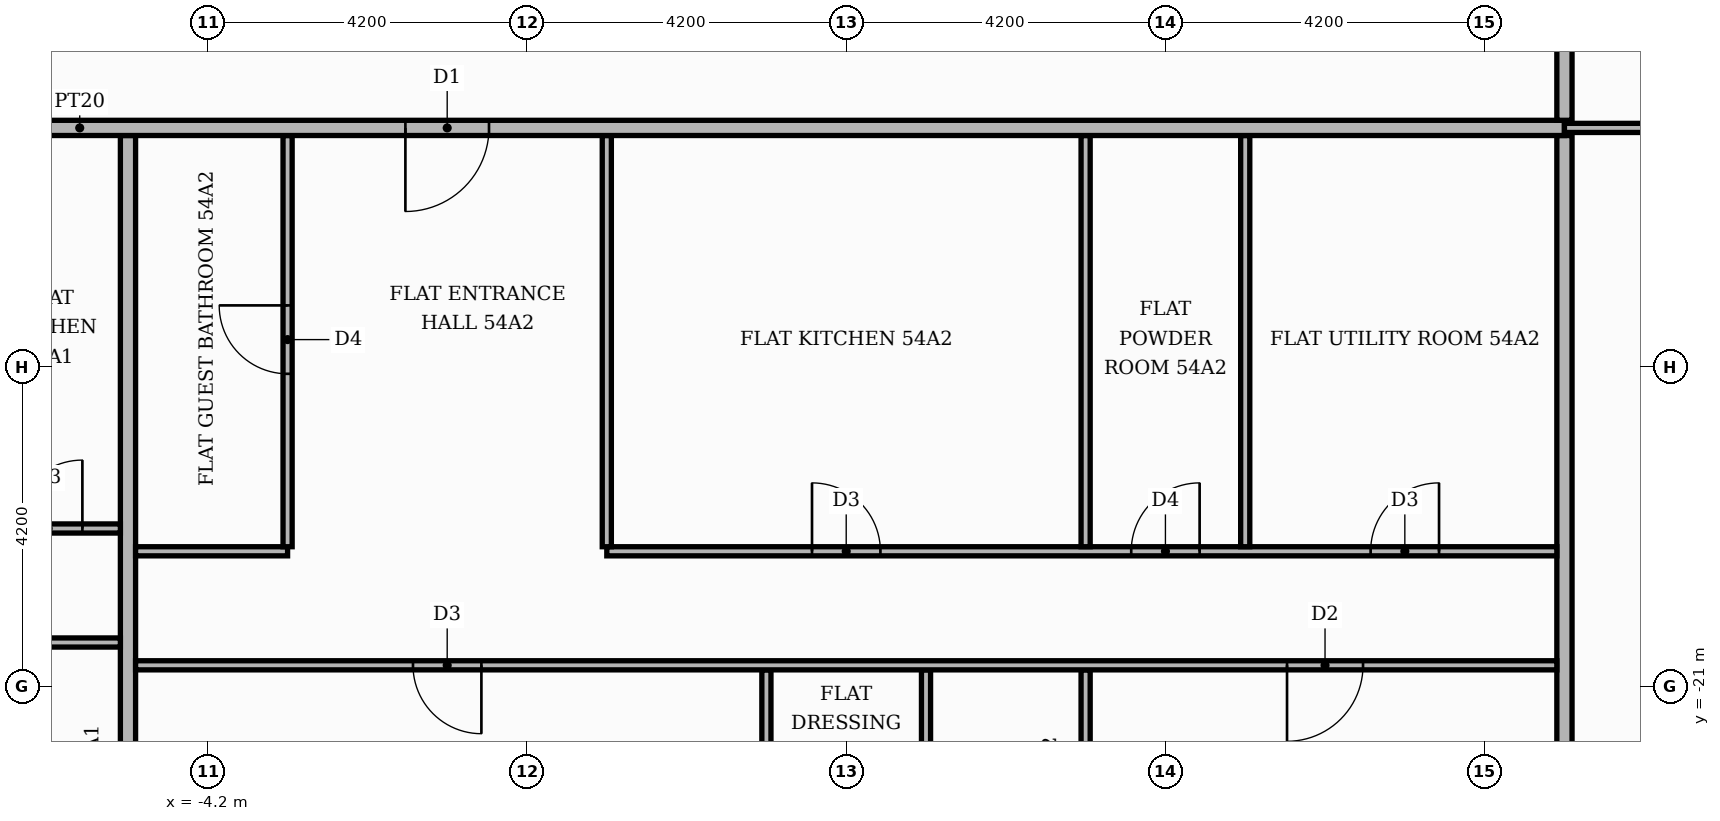
"""IFC4 building model, lengths in metres.
Left out: names, types, materials, properties, quantities, classifications, styles, units other than length and angle.
Written with IfcOpenShell. Run it as: python <this file> out.ifc"""

import sys

from ifc_helpers import new_model, si_unit, direction, frame, frame_2d, origin, place, context, subcontext, project, spatial, rectangle, extrude, element, fill, save


model = new_model("IFC4")
c1 = context("Model", 3, precision=1e-05, world=origin(), true_north=direction((0.0, 1.0)))
c2 = subcontext(c1, "Body", "Model", "MODEL_VIEW")
j1 = project(units=[si_unit("LENGTHUNIT", "METRE"), si_unit("PLANEANGLEUNIT", "RADIAN")], contexts=[c1])
p1 = place(None, origin())
s1 = spatial("IfcSite", under=j1, at=p1, CompositionType="ELEMENT")
p2 = place(p1, origin())
s2 = spatial("IfcBuilding", under=s1, at=p2, CompositionType="ELEMENT")
p3 = place(p2, frame((0.0, 0.0, 227.4)))
s3 = spatial("IfcBuildingStorey", under=s2, at=p3, CompositionType="ELEMENT", Elevation=227.4)
p4 = place(p3, frame((-5.25, -25.42, 0.0), z_axis=(0.0, 0.0, 1.0), x_axis=(0.0, 1.0, 0.0)))
e1 = element("IfcWall", 1, at=p4, inside=s3, PredefinedType="PARTITIONING", context=c2, shape_type="SweptSolid", body=[
    extrude(rectangle(XDim=11.67, YDim=0.2, at=frame_2d((5.835, 0.0))), origin(), (0.0, 0.0, 1.0), 3.48),
])
p5 = place(p3, frame((3.15, -25.42, 0.0), z_axis=(0.0, 0.0, 1.0), x_axis=(0.0, 1.0, 0.0)))
e2 = element("IfcWall", 2, at=p5, inside=s3, PredefinedType="PARTITIONING", context=c2, shape_type="SweptSolid", body=[
    extrude(rectangle(XDim=4.64, YDim=0.12, at=frame_2d((2.32, 0.0))), origin(), (0.0, 0.0, 1.0), 3.48),
])
p6 = place(p5, frame((1.75, 0.0, 0.0)))
e3 = element("IfcOpeningElement", 3, at=p6, cuts=e2, PredefinedType="OPENING", context=c2, shape_type="SweptSolid", body=[
    extrude(rectangle(XDim=0.9, YDim=2.1, at=frame_2d((0.45, 1.05))), frame((0.0, 0.07, 0.0), z_axis=(0.0, -1.0, 0.0), x_axis=(1.0, 0.0, 0.0)), (0.0, 0.0, 1.0), 0.14),
])
p7 = place(p3, frame((5.25, -25.42, 0.0), z_axis=(0.0, 0.0, 1.0), x_axis=(0.0, 1.0, 0.0)))
e4 = element("IfcWall", 4, at=p7, inside=s3, PredefinedType="PARTITIONING", context=c2, shape_type="SweptSolid", body=[
    extrude(rectangle(XDim=4.64, YDim=0.12, at=frame_2d((2.32, 0.0))), origin(), (0.0, 0.0, 1.0), 3.48),
])
p8 = place(p7, frame((1.75, 0.0, 0.0)))
e5 = element("IfcOpeningElement", 5, at=p8, cuts=e4, PredefinedType="OPENING", context=c2, shape_type="SweptSolid", body=[
    extrude(rectangle(XDim=0.9, YDim=2.1, at=frame_2d((0.45, 1.05))), frame((0.0, 0.07, 0.0), z_axis=(0.0, -1.0, 0.0), x_axis=(1.0, 0.0, 0.0)), (0.0, 0.0, 1.0), 0.14),
])
p9 = place(p3, frame((7.35, -25.42, 0.0), z_axis=(0.0, 0.0, 1.0), x_axis=(0.0, 1.0, 0.0)))
e6 = element("IfcWall", 6, at=p9, inside=s3, PredefinedType="PARTITIONING", context=c2, shape_type="SweptSolid", body=[
    extrude(rectangle(XDim=4.64, YDim=0.12, at=frame_2d((2.32, 0.0))), origin(), (0.0, 0.0, 1.0), 3.48),
])
p10 = place(p3, frame((13.65, -25.42, 0.0), z_axis=(0.0, 0.0, 1.0), x_axis=(0.0, 1.0, 0.0)))
e7 = element("IfcWall", 7, at=p10, inside=s3, PredefinedType="PARTITIONING", context=c2, shape_type="SweptSolid", body=[
    extrude(rectangle(XDim=11.67, YDim=0.2, at=frame_2d((5.835, 0.0))), origin(), (0.0, 0.0, 1.0), 3.48),
])
p11 = place(p3, frame((-5.15, -20.72, 0.0), z_axis=(0.0, 0.0, 1.0), x_axis=(1.0, 0.0, 0.0)))
e8 = element("IfcWall", 8, at=p11, inside=s3, PredefinedType="PARTITIONING", context=c2, shape_type="SweptSolid", body=[
    extrude(rectangle(XDim=18.7, YDim=0.12, at=frame_2d((9.35, 0.0))), origin(), (0.0, 0.0, 1.0), 3.48),
])
p12 = place(p11, frame((3.65, 0.0, 0.0)))
e9 = element("IfcOpeningElement", 9, at=p12, cuts=e8, PredefinedType="OPENING", context=c2, shape_type="SweptSolid", body=[
    extrude(rectangle(XDim=0.9, YDim=2.1, at=frame_2d((0.45, 1.05))), frame((0.0, 0.07, 0.0), z_axis=(0.0, -1.0, 0.0), x_axis=(1.0, 0.0, 0.0)), (0.0, 0.0, 1.0), 0.14),
])
p13 = place(p11, frame((15.15, 0.0, 0.0)))
e10 = element("IfcOpeningElement", 10, at=p13, cuts=e8, PredefinedType="OPENING", context=c2, shape_type="SweptSolid", body=[
    extrude(rectangle(XDim=1.0, YDim=2.1, at=frame_2d((0.5, 1.05))), frame((0.0, 0.07, 0.0), z_axis=(0.0, -1.0, 0.0), x_axis=(1.0, 0.0, 0.0)), (0.0, 0.0, 1.0), 0.14),
])
p14 = place(p3, frame((-21.219, -20.42, 0.0), z_axis=(0.0, 0.0, 1.0), x_axis=(1.0, 0.0, 0.0)))
e11 = element("IfcWall", 11, at=p14, inside=s3, PredefinedType="PARTITIONING", context=c2, shape_type="SweptSolid", body=[
    extrude(rectangle(XDim=15.869, YDim=0.12, at=frame_2d((7.935, 0.0))), origin(), (0.0, 0.0, 1.0), 3.48),
])
p15 = place(p14, frame((6.019, 0.0, 0.0)))
e12 = element("IfcOpeningElement", 12, at=p15, cuts=e11, PredefinedType="OPENING", context=c2, shape_type="SweptSolid", body=[
    extrude(rectangle(XDim=1.0, YDim=2.1, at=frame_2d((0.5, 1.05))), frame((0.0, 0.07, 0.0), z_axis=(0.0, -1.0, 0.0), x_axis=(1.0, 0.0, 0.0)), (0.0, 0.0, 1.0), 0.14),
])
p16 = place(p14, frame((9.219, 0.0, 0.0)))
e13 = element("IfcOpeningElement", 13, at=p16, cuts=e11, PredefinedType="OPENING", context=c2, shape_type="SweptSolid", body=[
    extrude(rectangle(XDim=0.9, YDim=2.1, at=frame_2d((0.45, 1.05))), frame((0.0, 0.07, 0.0), z_axis=(0.0, -1.0, 0.0), x_axis=(1.0, 0.0, 0.0)), (0.0, 0.0, 1.0), 0.14),
])
p17 = place(p3, frame((-5.15, -19.22, 0.0), z_axis=(0.0, 0.0, 1.0), x_axis=(1.0, 0.0, 0.0)))
e14 = element("IfcWall", 14, at=p17, inside=s3, PredefinedType="PARTITIONING", context=c2, shape_type="SweptSolid", body=[
    extrude(rectangle(XDim=2.0, YDim=0.12, at=frame_2d((1.0, 0.0))), origin(), (0.0, 0.0, 1.0), 3.48),
])
p18 = place(p3, frame((1.05, -19.22, 0.0), z_axis=(0.0, 0.0, 1.0), x_axis=(1.0, 0.0, 0.0)))
e15 = element("IfcWall", 15, at=p18, inside=s3, PredefinedType="PARTITIONING", context=c2, shape_type="SweptSolid", body=[
    extrude(rectangle(XDim=12.5, YDim=0.12, at=frame_2d((6.25, 0.0))), origin(), (0.0, 0.0, 1.0), 3.48),
])
p19 = place(p18, frame((2.7, 0.0, 0.0)))
e16 = element("IfcOpeningElement", 16, at=p19, cuts=e15, PredefinedType="OPENING", context=c2, shape_type="SweptSolid", body=[
    extrude(rectangle(XDim=0.9, YDim=2.1, at=frame_2d((0.45, 1.05))), frame((0.0, 0.07, 0.0), z_axis=(0.0, -1.0, 0.0), x_axis=(1.0, 0.0, 0.0)), (0.0, 0.0, 1.0), 0.14),
])
p20 = place(p18, frame((6.9, 0.0, 0.0)))
e17 = element("IfcOpeningElement", 17, at=p20, cuts=e15, PredefinedType="OPENING", context=c2, shape_type="SweptSolid", body=[
    extrude(rectangle(XDim=0.9, YDim=2.1, at=frame_2d((0.45, 1.05))), frame((0.0, 0.07, 0.0), z_axis=(0.0, -1.0, 0.0), x_axis=(1.0, 0.0, 0.0)), (0.0, 0.0, 1.0), 0.14),
])
p21 = place(p18, frame((10.05, 0.0, 0.0)))
e18 = element("IfcOpeningElement", 18, at=p21, cuts=e15, PredefinedType="OPENING", context=c2, shape_type="SweptSolid", body=[
    extrude(rectangle(XDim=0.9, YDim=2.1, at=frame_2d((0.45, 1.05))), frame((0.0, 0.07, 0.0), z_axis=(0.0, -1.0, 0.0), x_axis=(1.0, 0.0, 0.0)), (0.0, 0.0, 1.0), 0.14),
])
p22 = place(p3, frame((-3.15, -19.16, 0.0), z_axis=(0.0, 0.0, 1.0), x_axis=(0.0, 1.0, 0.0)))
e19 = element("IfcWall", 19, at=p22, inside=s3, PredefinedType="PARTITIONING", context=c2, shape_type="SweptSolid", body=[
    extrude(rectangle(XDim=5.41, YDim=0.12, at=frame_2d((2.705, 0.0))), origin(), (0.0, 0.0, 1.0), 3.48),
])
p23 = place(p22, frame((2.275, 0.0, 0.0)))
e20 = element("IfcOpeningElement", 20, at=p23, cuts=e19, PredefinedType="OPENING", context=c2, shape_type="SweptSolid", body=[
    extrude(rectangle(XDim=0.9, YDim=2.1, at=frame_2d((0.45, 1.05))), frame((0.0, 0.07, 0.0), z_axis=(0.0, -1.0, 0.0), x_axis=(1.0, 0.0, 0.0)), (0.0, 0.0, 1.0), 0.14),
])
for number, where, z_axis, x_axis in (
    (21, (1.05, -19.16, 0.0), (0.0, 0.0, 1.0), (0.0, 1.0, 0.0)),
    (22, (7.35, -19.16, 0.0), (0.0, 0.0, 1.0), (0.0, 1.0, 0.0)),
    (23, (9.45, -19.16, 0.0), (0.0, 0.0, 1.0), (0.0, 1.0, 0.0)),
):
    element("IfcWall", number, at=place(p3, frame(where, z_axis=z_axis, x_axis=x_axis)), inside=s3, PredefinedType="PARTITIONING", context=c2, shape_type="SweptSolid", body=[
        extrude(rectangle(XDim=5.41, YDim=0.12, at=frame_2d((2.705, 0.0))), origin(), (0.0, 0.0, 1.0), 3.48),
    ])
p24 = place(p3, frame((-9.45, -18.92, 0.0), z_axis=(0.0, 0.0, 1.0), x_axis=(1.0, 0.0, 0.0)))
e24 = element("IfcWall", 24, at=p24, inside=s3, PredefinedType="PARTITIONING", context=c2, shape_type="SweptSolid", body=[
    extrude(rectangle(XDim=4.1, YDim=0.12, at=frame_2d((2.05, 0.0))), origin(), (0.0, 0.0, 1.0), 3.48),
])
p25 = place(p24, frame((2.7, 0.0, 0.0)))
e25 = element("IfcOpeningElement", 25, at=p25, cuts=e24, PredefinedType="OPENING", context=c2, shape_type="SweptSolid", body=[
    extrude(rectangle(XDim=0.9, YDim=2.1, at=frame_2d((0.45, 1.05))), frame((0.0, 0.07, 0.0), z_axis=(0.0, -1.0, 0.0), x_axis=(1.0, 0.0, 0.0)), (0.0, 0.0, 1.0), 0.14),
])
p26 = place(p3, frame((-25.42, -13.65, 0.0), z_axis=(0.0, 0.0, 1.0), x_axis=(1.0, 0.0, 0.0)))
e26 = element("IfcWall", 26, at=p26, inside=s3, PredefinedType="PARTITIONING", context=c2, shape_type="SweptSolid", body=[
    extrude(rectangle(XDim=39.07, YDim=0.2, at=frame_2d((19.535, 0.0))), origin(), (0.0, 0.0, 1.0), 3.48),
])
p27 = place(p26, frame((13.32, 0.0, 0.0)))
e27 = element("IfcOpeningElement", 27, at=p27, cuts=e26, PredefinedType="OPENING", context=c2, shape_type="SweptSolid", body=[
    extrude(rectangle(XDim=1.1, YDim=2.4, at=frame_2d((0.55, 1.2))), frame((0.0, 0.11, 0.0), z_axis=(0.0, -1.0, 0.0), x_axis=(1.0, 0.0, 0.0)), (0.0, 0.0, 1.0), 0.22),
])
p28 = place(p26, frame((23.82, 0.0, 0.0)))
e28 = element("IfcOpeningElement", 28, at=p28, cuts=e26, PredefinedType="OPENING", context=c2, shape_type="SweptSolid", body=[
    extrude(rectangle(XDim=1.1, YDim=2.4, at=frame_2d((0.55, 1.2))), frame((0.0, 0.11, 0.0), z_axis=(0.0, -1.0, 0.0), x_axis=(1.0, 0.0, 0.0)), (0.0, 0.0, 1.0), 0.22),
])
p29 = place(p3, frame((13.65, -13.65, 0.0), z_axis=(0.0, 0.0, 1.0), x_axis=(1.0, 0.0, 0.0)))
e29 = element("IfcWall", 29, at=p29, inside=s3, PredefinedType="PARTITIONING", context=c2, shape_type="SweptSolid", body=[
    extrude(rectangle(XDim=6.769, YDim=0.12, at=frame_2d((3.385, 0.0))), origin(), (0.0, 0.0, 1.0), 3.48),
])
p30 = place(p29, frame((2.885, 0.0, 0.0)))
e30 = element("IfcOpeningElement", 30, at=p30, cuts=e29, PredefinedType="OPENING", context=c2, shape_type="SweptSolid", body=[
    extrude(rectangle(XDim=1.0, YDim=2.1, at=frame_2d((0.5, 1.05))), frame((0.0, 0.07, 0.0), z_axis=(0.0, -1.0, 0.0), x_axis=(1.0, 0.0, 0.0)), (0.0, 0.0, 1.0), 0.14),
])
p31 = place(p3, frame((13.65, -13.55, 0.0), z_axis=(0.0, 0.0, 1.0), x_axis=(0.0, 1.0, 0.0)))
e31 = element("IfcWall", 31, at=p31, inside=s3, PredefinedType="PARTITIONING", context=c2, shape_type="SweptSolid", body=[
    extrude(rectangle(XDim=2.45, YDim=0.2, at=frame_2d((1.225, 0.0))), origin(), (0.0, 0.0, 1.0), 3.48),
])
p32 = place(p25, origin())
e32 = element("IfcDoor", 32, at=p32, inside=s3, OperationType="SINGLE_SWING_RIGHT", PredefinedType="DOOR", context=c2, shape_type="SweptSolid", body=[
    extrude(rectangle(XDim=0.9, YDim=2.1, at=frame_2d((0.45, 1.05))), frame((0.0, 0.025, 0.0), z_axis=(0.0, -1.0, 0.0), x_axis=(1.0, 0.0, 0.0)), (0.0, 0.0, 1.0), 0.05),
])
fill(e25, e32)
p33 = place(p28, frame((1.1, 0.0, 0.0), z_axis=(0.0, 0.0, 1.0), x_axis=(-1.0, 0.0, 0.0)))
e33 = element("IfcDoor", 33, at=p33, inside=s3, OperationType="SINGLE_SWING_LEFT", PredefinedType="DOOR", context=c2, shape_type="SweptSolid", body=[
    extrude(rectangle(XDim=1.1, YDim=2.4, at=frame_2d((0.55, 1.2))), frame((0.0, 0.025, 0.0), z_axis=(0.0, -1.0, 0.0), x_axis=(1.0, 0.0, 0.0)), (0.0, 0.0, 1.0), 0.05),
])
fill(e28, e33)
p34 = place(p23, origin())
e34 = element("IfcDoor", 34, at=p34, inside=s3, OperationType="SINGLE_SWING_RIGHT", PredefinedType="DOOR", context=c2, shape_type="SweptSolid", body=[
    extrude(rectangle(XDim=0.9, YDim=2.1, at=frame_2d((0.45, 1.05))), frame((0.0, 0.025, 0.0), z_axis=(0.0, -1.0, 0.0), x_axis=(1.0, 0.0, 0.0)), (0.0, 0.0, 1.0), 0.05),
])
fill(e20, e34)
p35 = place(p19, origin())
e35 = element("IfcDoor", 35, at=p35, inside=s3, OperationType="SINGLE_SWING_LEFT", PredefinedType="DOOR", context=c2, shape_type="SweptSolid", body=[
    extrude(rectangle(XDim=0.9, YDim=2.1, at=frame_2d((0.45, 1.05))), frame((0.0, 0.025, 0.0), z_axis=(0.0, -1.0, 0.0), x_axis=(1.0, 0.0, 0.0)), (0.0, 0.0, 1.0), 0.05),
])
fill(e16, e35)
p36 = place(p20, origin())
e36 = element("IfcDoor", 36, at=p36, inside=s3, OperationType="SINGLE_SWING_RIGHT", PredefinedType="DOOR", context=c2, shape_type="SweptSolid", body=[
    extrude(rectangle(XDim=0.9, YDim=2.1, at=frame_2d((0.45, 1.05))), frame((0.0, 0.025, 0.0), z_axis=(0.0, -1.0, 0.0), x_axis=(1.0, 0.0, 0.0)), (0.0, 0.0, 1.0), 0.05),
])
fill(e17, e36)
p37 = place(p21, origin())
e37 = element("IfcDoor", 37, at=p37, inside=s3, OperationType="SINGLE_SWING_RIGHT", PredefinedType="DOOR", context=c2, shape_type="SweptSolid", body=[
    extrude(rectangle(XDim=0.9, YDim=2.1, at=frame_2d((0.45, 1.05))), frame((0.0, 0.025, 0.0), z_axis=(0.0, -1.0, 0.0), x_axis=(1.0, 0.0, 0.0)), (0.0, 0.0, 1.0), 0.05),
])
fill(e18, e37)
p38 = place(p12, frame((0.9, 0.0, 0.0), z_axis=(0.0, 0.0, 1.0), x_axis=(-1.0, 0.0, 0.0)))
e38 = element("IfcDoor", 38, at=p38, inside=s3, OperationType="SINGLE_SWING_RIGHT", PredefinedType="DOOR", context=c2, shape_type="SweptSolid", body=[
    extrude(rectangle(XDim=0.9, YDim=2.1, at=frame_2d((0.45, 1.05))), frame((0.0, 0.025, 0.0), z_axis=(0.0, -1.0, 0.0), x_axis=(1.0, 0.0, 0.0)), (0.0, 0.0, 1.0), 0.05),
])
fill(e9, e38)
p39 = place(p13, frame((1.0, 0.0, 0.0), z_axis=(0.0, 0.0, 1.0), x_axis=(-1.0, 0.0, 0.0)))
e39 = element("IfcDoor", 39, at=p39, inside=s3, OperationType="SINGLE_SWING_LEFT", PredefinedType="DOOR", context=c2, shape_type="SweptSolid", body=[
    extrude(rectangle(XDim=1.0, YDim=2.1, at=frame_2d((0.5, 1.05))), frame((0.0, 0.025, 0.0), z_axis=(0.0, -1.0, 0.0), x_axis=(1.0, 0.0, 0.0)), (0.0, 0.0, 1.0), 0.05),
])
fill(e10, e39)
save(model, sys.argv[1])
